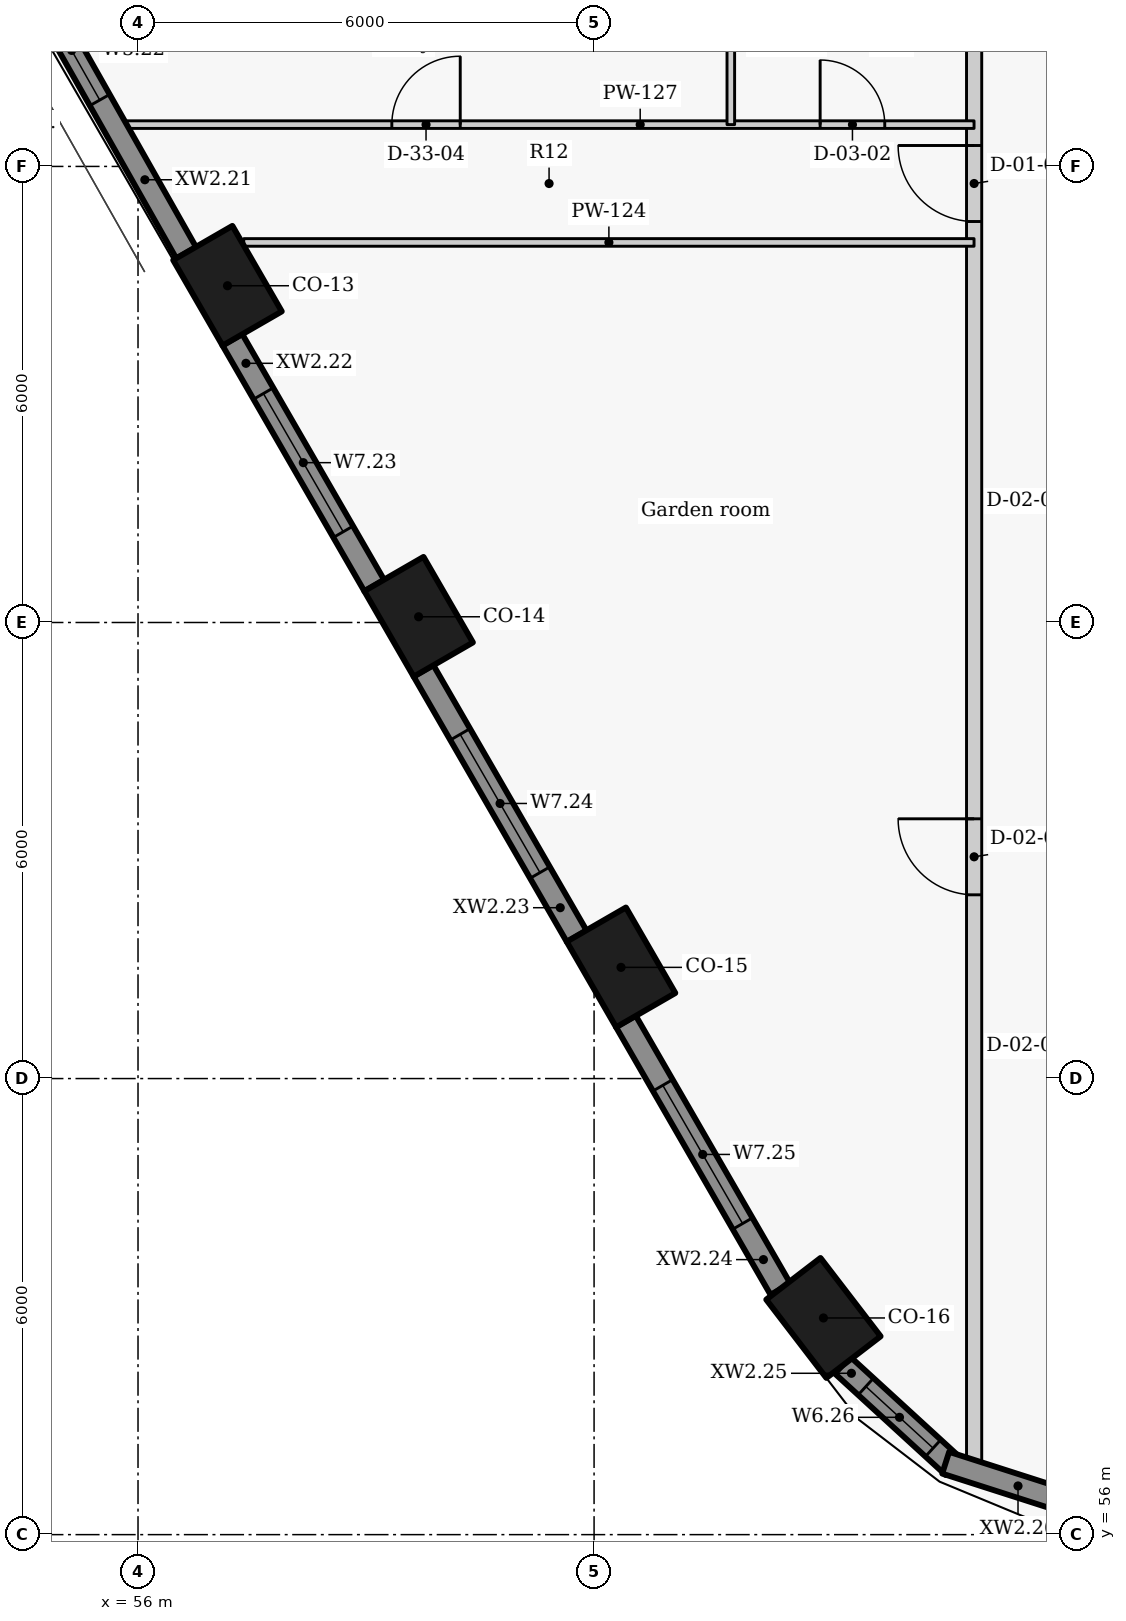
"""IFC4 building model, lengths in metres.
Left out: names, types, materials, properties, quantities, classifications, styles, units other than length and angle.
Written with IfcOpenShell. Run it as: python <this file> out.ifc"""

import sys

from ifc_helpers import new_model, si_unit, direction, frame, frame_2d, origin, origin_2d, place, context, subcontext, project, spatial, rectangle, extrude, element, fill, save


model = new_model("IFC4")
c1 = context("Model", 3, precision=1e-05, world=origin(), true_north=direction((0.0, 1.0)))
c2 = subcontext(c1, "Body", "Model", "MODEL_VIEW")
j1 = project(units=[si_unit("LENGTHUNIT", "METRE"), si_unit("PLANEANGLEUNIT", "RADIAN")], contexts=[c1])
p1 = place(None, origin())
s1 = spatial("IfcSite", under=j1, at=p1, CompositionType="ELEMENT")
p2 = place(p1, origin())
s2 = spatial("IfcBuilding", under=s1, at=p2, CompositionType="ELEMENT")
p3 = place(p2, frame((0.0, 0.0, 140.4)))
s3 = spatial("IfcBuildingStorey", under=s2, at=p3, CompositionType="ELEMENT", Elevation=140.4)
for number, where, z_axis, x_axis in (
    (1, (57.177, 72.43, 0.0), (0.0, 0.0, 1.0), (0.5, -0.866, 0.0)),
    (2, (59.692, 68.075, 0.0), (0.0, 0.0, 1.0), (0.5, -0.866, 0.0)),
    (3, (62.354, 63.463, 0.0), (0.0, 0.0, 1.0), (0.5, -0.866, 0.0)),
    (4, (65.018, 58.851, 0.0), (0.0, 0.0, 1.0), (0.609, -0.793, 0.0)),
):
    element("IfcColumn", number, at=place(p3, frame(where, z_axis=z_axis, x_axis=x_axis)), inside=s3, PredefinedType="COLUMN", context=c2, shape_type="SweptSolid", body=[
        extrude(rectangle(XDim=1.3, YDim=0.9, at=origin_2d()), origin(), (0.0, 0.0, 1.0), 3.3),
    ])
p4 = place(p3, frame((53.814, 77.847, 0.0), z_axis=(0.0, 0.0, 1.0), x_axis=(0.492498306264, -0.87031340236, 0.0)))
e5 = element("IfcWall", 5, at=p4, inside=s3, PredefinedType="SOLIDWALL", context=c2, shape_type="SweptSolid", body=[
    extrude(rectangle(XDim=5.727, YDim=0.3, at=frame_2d((2.863, 0.0))), origin(), (0.0, 0.0, 1.0), 2.425),
])
p5 = place(p4, frame((1.916, 0.0, 0.9)))
e6 = element("IfcOpeningElement", 6, at=p5, cuts=e5, PredefinedType="OPENING", context=c2, shape_type="SweptSolid", body=[
    extrude(rectangle(XDim=1.5, YDim=1.1, at=frame_2d((0.75, 0.55))), frame((0.0, 0.16, 0.0), z_axis=(0.0, -1.0, 0.0), x_axis=(1.0, 0.0, 0.0)), (0.0, 0.0, 1.0), 0.32),
])
p6 = place(p3, frame((57.24, 71.721, 0.0), z_axis=(0.0, 0.0, 1.0), x_axis=(0.499933594891, -0.866063739398, 0.0)))
e7 = element("IfcWall", 7, at=p6, inside=s3, PredefinedType="SOLIDWALL", context=c2, shape_type="SweptSolid", body=[
    extrude(rectangle(XDim=3.737, YDim=0.3, at=frame_2d((1.868, 0.0))), origin(), (0.0, 0.0, 1.0), 2.425),
])
p7 = place(p6, frame((0.818, 0.0, 0.9)))
e8 = element("IfcOpeningElement", 8, at=p7, cuts=e7, PredefinedType="OPENING", context=c2, shape_type="SweptSolid", body=[
    extrude(rectangle(XDim=2.1, YDim=1.1, at=frame_2d((1.05, 0.55))), frame((0.0, 0.16, 0.0), z_axis=(0.0, -1.0, 0.0), x_axis=(1.0, 0.0, 0.0)), (0.0, 0.0, 1.0), 0.32),
])
p8 = place(p3, frame((59.755, 67.366, 0.0), z_axis=(0.0, 0.0, 1.0), x_axis=(0.500031546601, -0.86600718958, 0.0)))
e9 = element("IfcWall", 9, at=p8, inside=s3, PredefinedType="SOLIDWALL", context=c2, shape_type="SweptSolid", body=[
    extrude(rectangle(XDim=4.034, YDim=0.3, at=frame_2d((2.017, 0.0))), origin(), (0.0, 0.0, 1.0), 2.425),
])
p9 = place(p8, frame((0.967, 0.0, 0.9)))
e10 = element("IfcOpeningElement", 10, at=p9, cuts=e9, PredefinedType="OPENING", context=c2, shape_type="SweptSolid", body=[
    extrude(rectangle(XDim=2.1, YDim=1.1, at=frame_2d((1.05, 0.55))), frame((0.0, 0.16, 0.0), z_axis=(0.0, -1.0, 0.0), x_axis=(1.0, 0.0, 0.0)), (0.0, 0.0, 1.0), 0.32),
])
p10 = place(p3, frame((62.418, 62.753, 0.0), z_axis=(0.0, 0.0, 1.0), x_axis=(0.500018589245, -0.866014671013, 0.0)))
e11 = element("IfcWall", 11, at=p10, inside=s3, PredefinedType="SOLIDWALL", context=c2, shape_type="SweptSolid", body=[
    extrude(rectangle(XDim=4.068, YDim=0.3, at=frame_2d((2.034, 0.0))), origin(), (0.0, 0.0, 1.0), 2.425),
])
p11 = place(p10, frame((0.973, 0.0, 0.9)))
e12 = element("IfcOpeningElement", 12, at=p11, cuts=e11, PredefinedType="OPENING", context=c2, shape_type="SweptSolid", body=[
    extrude(rectangle(XDim=2.1, YDim=1.1, at=frame_2d((1.05, 0.55))), frame((0.0, 0.16, 0.0), z_axis=(0.0, -1.0, 0.0), x_axis=(1.0, 0.0, 0.0)), (0.0, 0.0, 1.0), 0.32),
])
p12 = place(p3, frame((65.269, 58.229, 0.0), z_axis=(0.0, 0.0, 1.0), x_axis=(0.737487298625, -0.675361002995, 0.0)))
e13 = element("IfcWall", 13, at=p12, inside=s3, PredefinedType="SOLIDWALL", context=c2, shape_type="SweptSolid", body=[
    extrude(rectangle(XDim=1.977, YDim=0.3, at=frame_2d((0.988, 0.0))), origin(), (0.0, 0.0, 1.0), 2.425),
])
p13 = place(p12, frame((0.416, 0.0, 0.9)))
e14 = element("IfcOpeningElement", 14, at=p13, cuts=e13, PredefinedType="OPENING", context=c2, shape_type="SweptSolid", body=[
    extrude(rectangle(XDim=1.2, YDim=1.1, at=frame_2d((0.6, 0.55))), frame((0.0, 0.16, 0.0), z_axis=(0.0, -1.0, 0.0), x_axis=(1.0, 0.0, 0.0)), (0.0, 0.0, 1.0), 0.32),
])
p14 = place(p3, frame((66.626, 56.946, 0.0), z_axis=(0.0, 0.0, 1.0), x_axis=(0.952201240673, -0.305471434444, 0.0)))
e15 = element("IfcWall", 15, at=p14, inside=s3, PredefinedType="SOLIDWALL", context=c2, shape_type="SweptSolid", body=[
    extrude(rectangle(XDim=1.999, YDim=0.3, at=frame_2d((1.0, 0.0))), origin(), (0.0, 0.0, 1.0), 2.425),
])
p15 = place(p3, frame((67.0, 56.833, 0.0), z_axis=(0.0, 0.0, 1.0), x_axis=(0.0, 1.0, 0.0)))
e16 = element("IfcWall", 16, at=p15, inside=s3, PredefinedType="PARTITIONING", context=c2, shape_type="SweptSolid", body=[
    extrude(rectangle(XDim=45.661, YDim=0.2, at=frame_2d((22.831, 0.0))), origin(), (0.0, 0.0, 1.0), 2.405),
])
p16 = place(p15, frame((7.584, 0.0, 0.0)))
e17 = element("IfcOpeningElement", 17, at=p16, cuts=e16, PredefinedType="OPENING", context=c2, shape_type="SweptSolid", body=[
    extrude(rectangle(XDim=1.0, YDim=2.1, at=frame_2d((0.5, 1.05))), frame((0.0, 0.11, 0.0), z_axis=(0.0, -1.0, 0.0), x_axis=(1.0, 0.0, 0.0)), (0.0, 0.0, 1.0), 0.22),
])
p17 = place(p15, frame((16.442, 0.0, 0.0)))
e18 = element("IfcOpeningElement", 18, at=p17, cuts=e16, PredefinedType="OPENING", context=c2, shape_type="SweptSolid", body=[
    extrude(rectangle(XDim=1.0, YDim=2.1, at=frame_2d((0.5, 1.05))), frame((0.0, 0.11, 0.0), z_axis=(0.0, -1.0, 0.0), x_axis=(1.0, 0.0, 0.0)), (0.0, 0.0, 1.0), 0.22),
])
p18 = place(p15, frame((26.942, 0.0, 0.0)))
e19 = element("IfcOpeningElement", 19, at=p18, cuts=e16, PredefinedType="OPENING", context=c2, shape_type="SweptSolid", body=[
    extrude(rectangle(XDim=1.0, YDim=2.1, at=frame_2d((0.5, 1.05))), frame((0.0, 0.11, 0.0), z_axis=(0.0, -1.0, 0.0), x_axis=(1.0, 0.0, 0.0)), (0.0, 0.0, 1.0), 0.22),
])
p19 = place(p3, frame((57.391, 73.0, 0.0), z_axis=(0.0, 0.0, 1.0), x_axis=(1.0, 0.0, 0.0)))
e20 = element("IfcWall", 20, at=p19, inside=s3, PredefinedType="PARTITIONING", context=c2, shape_type="SweptSolid", body=[
    extrude(rectangle(XDim=9.608, YDim=0.1, at=frame_2d((4.804, 0.0))), origin(), (0.0, 0.0, 1.0), 3.025),
])
p20 = place(p3, frame((55.78, 74.55, 0.0), z_axis=(0.0, 0.0, 1.0), x_axis=(1.0, 0.0, 0.0)))
e21 = element("IfcWall", 21, at=p20, inside=s3, PredefinedType="PARTITIONING", context=c2, shape_type="SweptSolid", body=[
    extrude(rectangle(XDim=11.219, YDim=0.1, at=frame_2d((5.609, 0.0))), origin(), (0.0, 0.0, 1.0), 2.405),
])
p21 = place(p20, frame((9.194, 0.0, 0.0)))
e22 = element("IfcOpeningElement", 22, at=p21, cuts=e21, PredefinedType="OPENING", context=c2, shape_type="SweptSolid", body=[
    extrude(rectangle(XDim=0.85, YDim=2.1, at=frame_2d((0.425, 1.05))), frame((0.0, 0.06, 0.0), z_axis=(0.0, -1.0, 0.0), x_axis=(1.0, 0.0, 0.0)), (0.0, 0.0, 1.0), 0.12),
])
p22 = place(p20, frame((3.559, 0.0, 0.0)))
e23 = element("IfcOpeningElement", 23, at=p22, cuts=e21, PredefinedType="OPENING", context=c2, shape_type="SweptSolid", body=[
    extrude(rectangle(XDim=0.9, YDim=2.1, at=frame_2d((0.45, 1.05))), frame((0.0, 0.06, 0.0), z_axis=(0.0, -1.0, 0.0), x_axis=(1.0, 0.0, 0.0)), (0.0, 0.0, 1.0), 0.12),
])
p23 = place(p3, frame((63.799, 74.55, 0.0), z_axis=(0.0, 0.0, 1.0), x_axis=(0.0, 1.0, 0.0)))
e24 = element("IfcWall", 24, at=p23, inside=s3, PredefinedType="PARTITIONING", context=c2, shape_type="SweptSolid", body=[
    extrude(rectangle(XDim=2.12, YDim=0.1, at=frame_2d((1.06, 0.0))), origin(), (0.0, 0.0, 1.0), 3.025),
])
p24 = place(p5, origin())
e25 = element("IfcWindow", 25, at=p24, inside=s3, PartitioningType="SINGLE_PANEL", PredefinedType="WINDOW", context=c2, shape_type="SweptSolid", body=[
    extrude(rectangle(XDim=1.5, YDim=1.1, at=frame_2d((0.75, 0.55))), frame((0.0, 0.03, 0.0), z_axis=(0.0, -1.0, 0.0), x_axis=(1.0, 0.0, 0.0)), (0.0, 0.0, 1.0), 0.06),
])
fill(e6, e25)
p25 = place(p7, origin())
e26 = element("IfcWindow", 26, at=p25, inside=s3, PartitioningType="SINGLE_PANEL", PredefinedType="WINDOW", context=c2, shape_type="SweptSolid", body=[
    extrude(rectangle(XDim=2.1, YDim=1.1, at=frame_2d((1.05, 0.55))), frame((0.0, 0.03, 0.0), z_axis=(0.0, -1.0, 0.0), x_axis=(1.0, 0.0, 0.0)), (0.0, 0.0, 1.0), 0.06),
])
fill(e8, e26)
p26 = place(p9, origin())
e27 = element("IfcWindow", 27, at=p26, inside=s3, PartitioningType="SINGLE_PANEL", PredefinedType="WINDOW", context=c2, shape_type="SweptSolid", body=[
    extrude(rectangle(XDim=2.1, YDim=1.1, at=frame_2d((1.05, 0.55))), frame((0.0, 0.03, 0.0), z_axis=(0.0, -1.0, 0.0), x_axis=(1.0, 0.0, 0.0)), (0.0, 0.0, 1.0), 0.06),
])
fill(e10, e27)
p27 = place(p11, origin())
e28 = element("IfcWindow", 28, at=p27, inside=s3, PartitioningType="SINGLE_PANEL", PredefinedType="WINDOW", context=c2, shape_type="SweptSolid", body=[
    extrude(rectangle(XDim=2.1, YDim=1.1, at=frame_2d((1.05, 0.55))), frame((0.0, 0.03, 0.0), z_axis=(0.0, -1.0, 0.0), x_axis=(1.0, 0.0, 0.0)), (0.0, 0.0, 1.0), 0.06),
])
fill(e12, e28)
p28 = place(p13, origin())
e29 = element("IfcWindow", 29, at=p28, inside=s3, PartitioningType="SINGLE_PANEL", PredefinedType="WINDOW", context=c2, shape_type="SweptSolid", body=[
    extrude(rectangle(XDim=1.2, YDim=1.1, at=frame_2d((0.6, 0.55))), frame((0.0, 0.03, 0.0), z_axis=(0.0, -1.0, 0.0), x_axis=(1.0, 0.0, 0.0)), (0.0, 0.0, 1.0), 0.06),
])
fill(e14, e29)
p29 = place(p16, origin())
e30 = element("IfcDoor", 30, at=p29, inside=s3, OperationType="SINGLE_SWING_RIGHT", PredefinedType="DOOR", context=c2, shape_type="SweptSolid", body=[
    extrude(rectangle(XDim=1.0, YDim=2.1, at=frame_2d((0.5, 1.05))), frame((0.0, 0.025, 0.0), z_axis=(0.0, -1.0, 0.0), x_axis=(1.0, 0.0, 0.0)), (0.0, 0.0, 1.0), 0.05),
])
fill(e17, e30)
p30 = place(p17, origin())
e31 = element("IfcDoor", 31, at=p30, inside=s3, OperationType="SINGLE_SWING_RIGHT", PredefinedType="DOOR", context=c2, shape_type="SweptSolid", body=[
    extrude(rectangle(XDim=1.0, YDim=2.1, at=frame_2d((0.5, 1.05))), frame((0.0, 0.025, 0.0), z_axis=(0.0, -1.0, 0.0), x_axis=(1.0, 0.0, 0.0)), (0.0, 0.0, 1.0), 0.05),
])
fill(e18, e31)
p31 = place(p21, origin())
e32 = element("IfcDoor", 32, at=p31, inside=s3, OperationType="SINGLE_SWING_LEFT", PredefinedType="DOOR", context=c2, shape_type="SweptSolid", body=[
    extrude(rectangle(XDim=0.85, YDim=2.1, at=frame_2d((0.425, 1.05))), frame((0.0, 0.025, 0.0), z_axis=(0.0, -1.0, 0.0), x_axis=(1.0, 0.0, 0.0)), (0.0, 0.0, 1.0), 0.05),
])
fill(e22, e32)
p32 = place(p22, origin())
e33 = element("IfcDoor", 33, at=p32, inside=s3, OperationType="SINGLE_SWING_RIGHT", PredefinedType="DOOR", context=c2, shape_type="SweptSolid", body=[
    extrude(rectangle(XDim=0.9, YDim=2.1, at=frame_2d((0.45, 1.05))), frame((0.0, 0.025, 0.0), z_axis=(0.0, -1.0, 0.0), x_axis=(1.0, 0.0, 0.0)), (0.0, 0.0, 1.0), 0.05),
])
fill(e23, e33)
save(model, sys.argv[1])
